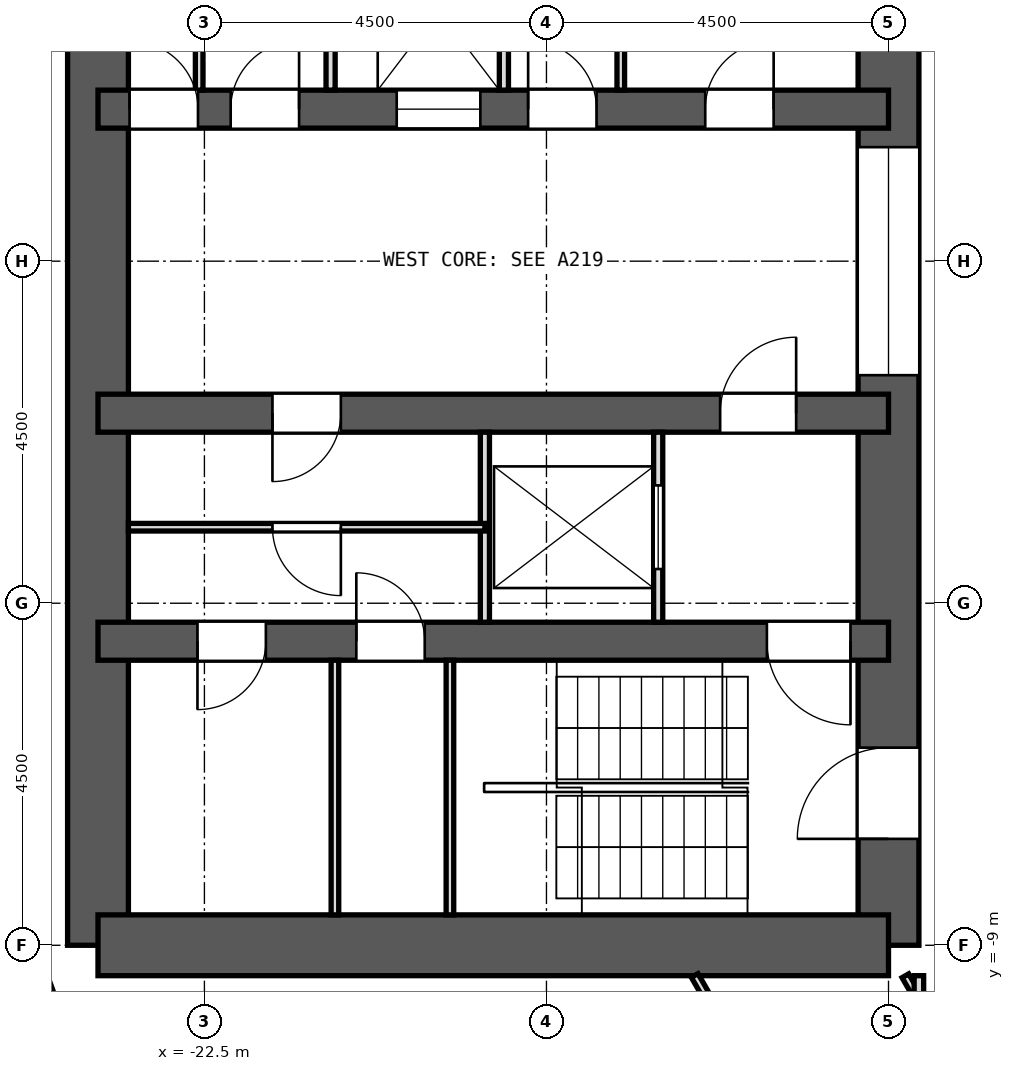
"""IFC4 building model, lengths in metres.
Left out: names, types, materials, properties, quantities, classifications, styles, units other than length and angle.
Written with IfcOpenShell. Run it as: python <this file> out.ifc"""

import sys

from ifc_helpers import new_model, si_unit, direction, frame, frame_2d, origin, place, context, subcontext, project, spatial, rectangle, extrude, element, fill, save


model = new_model("IFC4")
c1 = context("Model", 3, precision=1e-05, world=origin(), true_north=direction((0.0, 1.0)))
c2 = subcontext(c1, "Body", "Model", "MODEL_VIEW")
j1 = project(units=[si_unit("LENGTHUNIT", "METRE"), si_unit("PLANEANGLEUNIT", "RADIAN")], contexts=[c1])
p1 = place(None, origin())
s1 = spatial("IfcSite", under=j1, at=p1, CompositionType="ELEMENT")
p2 = place(p1, origin())
s2 = spatial("IfcBuilding", under=s1, at=p2, CompositionType="ELEMENT")
p3 = place(p2, frame((0.0, 0.0, 111.7)))
s3 = spatial("IfcBuildingStorey", under=s2, at=p3, CompositionType="ELEMENT", Elevation=111.7)
p4 = place(p3, frame((-13.5, -9.0, 0.0), z_axis=(0.0, 0.0, 1.0), x_axis=(0.0, 1.0, 0.0)))
e1 = element("IfcWall", 1, at=p4, inside=s3, PredefinedType="SHEAR", context=c2, shape_type="SweptSolid", body=[
    extrude(rectangle(XDim=18.0, YDim=0.8, at=frame_2d((9.0, 0.0))), origin(), (0.0, 0.0, 1.0), 3.3),
])
p5 = place(p4, frame((15.4, 0.0, 0.0)))
e2 = element("IfcOpeningElement", 2, at=p5, cuts=e1, PredefinedType="OPENING", context=c2, shape_type="SweptSolid", body=[
    extrude(rectangle(XDim=1.2, YDim=2.1, at=frame_2d((0.6, 1.05))), frame((0.0, 0.412, 0.0), z_axis=(0.0, -1.0, 0.0), x_axis=(1.0, 0.0, 0.0)), (0.0, 0.0, 1.0), 0.824),
])
p6 = place(p4, frame((1.4, 0.0, 0.0)))
e3 = element("IfcOpeningElement", 3, at=p6, cuts=e1, PredefinedType="OPENING", context=c2, shape_type="SweptSolid", body=[
    extrude(rectangle(XDim=1.2, YDim=2.1, at=frame_2d((0.6, 1.05))), frame((0.0, 0.412, 0.0), z_axis=(0.0, -1.0, 0.0), x_axis=(1.0, 0.0, 0.0)), (0.0, 0.0, 1.0), 0.824),
])
p7 = place(p4, frame((7.5, 0.0, 0.0)))
e4 = element("IfcOpeningElement", 4, at=p7, cuts=e1, PredefinedType="OPENING", context=c2, shape_type="SweptSolid", body=[
    extrude(rectangle(XDim=3.0, YDim=2.4, at=frame_2d((1.5, 1.2))), frame((0.0, 0.412, 0.0), z_axis=(0.0, -1.0, 0.0), x_axis=(1.0, 0.0, 0.0)), (0.0, 0.0, 1.0), 0.824),
])
p8 = place(p3, frame((-23.9, -9.0, 0.0), z_axis=(0.0, 0.0, 1.0), x_axis=(0.0, 1.0, 0.0)))
e5 = element("IfcWall", 5, at=p8, inside=s3, PredefinedType="SHEAR", context=c2, shape_type="SweptSolid", body=[
    extrude(rectangle(XDim=18.0, YDim=0.8, at=frame_2d((9.0, 0.0))), origin(), (0.0, 0.0, 1.0), 3.3),
])
p9 = place(p3, frame((-13.5, -9.0, 0.0), z_axis=(0.0, 0.0, 1.0), x_axis=(-1.0, 0.0, 0.0)))
e6 = element("IfcWall", 6, at=p9, inside=s3, PredefinedType="SHEAR", context=c2, shape_type="SweptSolid", body=[
    extrude(rectangle(XDim=10.4, YDim=0.8, at=frame_2d((5.2, 0.0))), origin(), (0.0, 0.0, 1.0), 3.3),
])
p10 = place(p3, frame((-13.5, -5.0, 0.0), z_axis=(0.0, 0.0, 1.0), x_axis=(-1.0, 0.0, 0.0)))
e7 = element("IfcWall", 7, at=p10, inside=s3, PredefinedType="SHEAR", context=c2, shape_type="SweptSolid", body=[
    extrude(rectangle(XDim=10.4, YDim=0.5, at=frame_2d((5.2, 0.0))), origin(), (0.0, 0.0, 1.0), 3.3),
])
p11 = place(p10, frame((6.102, 0.0, 0.0)))
e8 = element("IfcOpeningElement", 8, at=p11, cuts=e7, PredefinedType="OPENING", context=c2, shape_type="SweptSolid", body=[
    extrude(rectangle(XDim=0.9, YDim=2.1, at=frame_2d((0.45, 1.05))), frame((0.0, 0.262, 0.0), z_axis=(0.0, -1.0, 0.0), x_axis=(1.0, 0.0, 0.0)), (0.0, 0.0, 1.0), 0.524),
])
p12 = place(p10, frame((8.191, 0.0, 0.0)))
e9 = element("IfcOpeningElement", 9, at=p12, cuts=e7, PredefinedType="OPENING", context=c2, shape_type="SweptSolid", body=[
    extrude(rectangle(XDim=0.9, YDim=2.1, at=frame_2d((0.45, 1.05))), frame((0.0, 0.262, 0.0), z_axis=(0.0, -1.0, 0.0), x_axis=(1.0, 0.0, 0.0)), (0.0, 0.0, 1.0), 0.524),
])
p13 = place(p10, frame((0.5, 0.0, 0.0)))
e10 = element("IfcOpeningElement", 10, at=p13, cuts=e7, PredefinedType="OPENING", context=c2, shape_type="SweptSolid", body=[
    extrude(rectangle(XDim=1.1, YDim=2.1, at=frame_2d((0.55, 1.05))), frame((0.0, 0.262, 0.0), z_axis=(0.0, -1.0, 0.0), x_axis=(1.0, 0.0, 0.0)), (0.0, 0.0, 1.0), 0.524),
])
p14 = place(p3, frame((-13.5, 2.0, 0.0), z_axis=(0.0, 0.0, 1.0), x_axis=(-1.0, 0.0, 0.0)))
e11 = element("IfcWall", 11, at=p14, inside=s3, PredefinedType="SHEAR", context=c2, shape_type="SweptSolid", body=[
    extrude(rectangle(XDim=10.4, YDim=0.5, at=frame_2d((5.2, 0.0))), origin(), (0.0, 0.0, 1.0), 3.3),
])
p15 = place(p14, frame((5.37, 0.0, 0.0)))
e12 = element("IfcOpeningElement", 12, at=p15, cuts=e11, PredefinedType="OPENING", context=c2, shape_type="SweptSolid", body=[
    extrude(rectangle(XDim=1.1, YDim=2.1, at=frame_2d((0.55, 1.05))), frame((0.0, 0.262, 0.0), z_axis=(0.0, -1.0, 0.0), x_axis=(1.0, 0.0, 0.0)), (0.0, 0.0, 1.0), 0.524),
])
p16 = place(p14, frame((1.511, 0.0, 0.0)))
e13 = element("IfcOpeningElement", 13, at=p16, cuts=e11, PredefinedType="OPENING", context=c2, shape_type="SweptSolid", body=[
    extrude(rectangle(XDim=0.9, YDim=2.1, at=frame_2d((0.45, 1.05))), frame((0.0, 0.262, 0.0), z_axis=(0.0, -1.0, 0.0), x_axis=(1.0, 0.0, 0.0)), (0.0, 0.0, 1.0), 0.524),
])
p17 = place(p14, frame((3.841, 0.0, 0.0)))
e14 = element("IfcOpeningElement", 14, at=p17, cuts=e11, PredefinedType="OPENING", context=c2, shape_type="SweptSolid", body=[
    extrude(rectangle(XDim=0.9, YDim=2.1, at=frame_2d((0.45, 1.05))), frame((0.0, 0.262, 0.0), z_axis=(0.0, -1.0, 0.0), x_axis=(1.0, 0.0, 0.0)), (0.0, 0.0, 1.0), 0.524),
])
p18 = place(p14, frame((7.754, 0.0, 0.0)))
e15 = element("IfcOpeningElement", 15, at=p18, cuts=e11, PredefinedType="OPENING", context=c2, shape_type="SweptSolid", body=[
    extrude(rectangle(XDim=0.9, YDim=2.1, at=frame_2d((0.45, 1.05))), frame((0.0, 0.262, 0.0), z_axis=(0.0, -1.0, 0.0), x_axis=(1.0, 0.0, 0.0)), (0.0, 0.0, 1.0), 0.524),
])
p19 = place(p14, frame((9.084, 0.0, 0.0)))
e16 = element("IfcOpeningElement", 16, at=p19, cuts=e11, PredefinedType="OPENING", context=c2, shape_type="SweptSolid", body=[
    extrude(rectangle(XDim=0.9, YDim=2.1, at=frame_2d((0.45, 1.05))), frame((0.0, 0.262, 0.0), z_axis=(0.0, -1.0, 0.0), x_axis=(1.0, 0.0, 0.0)), (0.0, 0.0, 1.0), 0.524),
])
p20 = place(p3, frame((-13.5, -2.0, 0.0), z_axis=(0.0, 0.0, 1.0), x_axis=(-1.0, 0.0, 0.0)))
e17 = element("IfcWall", 17, at=p20, inside=s3, PredefinedType="SHEAR", context=c2, shape_type="SweptSolid", body=[
    extrude(rectangle(XDim=10.4, YDim=0.5, at=frame_2d((5.2, 0.0))), origin(), (0.0, 0.0, 1.0), 3.3),
])
p21 = place(p20, frame((1.215, 0.0, 0.0)))
e18 = element("IfcOpeningElement", 18, at=p21, cuts=e17, PredefinedType="OPENING", context=c2, shape_type="SweptSolid", body=[
    extrude(rectangle(XDim=1.0, YDim=2.1, at=frame_2d((0.5, 1.05))), frame((0.0, 0.262, 0.0), z_axis=(0.0, -1.0, 0.0), x_axis=(1.0, 0.0, 0.0)), (0.0, 0.0, 1.0), 0.524),
])
p22 = place(p20, frame((7.205, 0.0, 0.0)))
e19 = element("IfcOpeningElement", 19, at=p22, cuts=e17, PredefinedType="OPENING", context=c2, shape_type="SweptSolid", body=[
    extrude(rectangle(XDim=0.9, YDim=2.1, at=frame_2d((0.45, 1.05))), frame((0.0, 0.262, 0.0), z_axis=(0.0, -1.0, 0.0), x_axis=(1.0, 0.0, 0.0)), (0.0, 0.0, 1.0), 0.524),
])
p23 = place(p3, frame((-25.617, -7.383, 0.0), z_axis=(0.0, 0.0, 1.0), x_axis=(0.341990236633, -0.939703505393, 0.0)))
e20 = element("IfcWall", 20, at=p23, inside=s3, PredefinedType="SOLIDWALL", context=c2, shape_type="SweptSolid", body=[
    extrude(rectangle(XDim=3.648, YDim=0.6, at=frame_2d((1.824, 0.0))), origin(), (0.0, 0.0, 1.0), 2.8),
])
p24 = place(p3, frame((-13.278, -9.401, 0.0), z_axis=(0.0, 0.0, 1.0), x_axis=(0.49953088146, -0.866296080141, 0.0)))
e21 = element("IfcWall", 21, at=p24, inside=s3, PredefinedType="PARTITIONING", context=c2, shape_type="SweptSolid", body=[
    extrude(rectangle(XDim=0.294, YDim=0.1, at=frame_2d((0.147, 0.0))), origin(), (0.0, 0.0, 1.0), 2.8),
])
p25 = place(p3, frame((-16.05, -9.398, 0.0), z_axis=(0.0, 0.0, 1.0), x_axis=(0.499614353746, -0.866247942296, 0.0)))
e22 = element("IfcWall", 22, at=p25, inside=s3, PredefinedType="PARTITIONING", context=c2, shape_type="SweptSolid", body=[
    extrude(rectangle(XDim=1.564, YDim=0.1, at=frame_2d((0.782, 0.0))), origin(), (0.0, 0.0, 1.0), 2.8),
])
p26 = place(p3, frame((-13.167, -13.166, 0.0), z_axis=(0.0, 0.0, 1.0), x_axis=(0.707391477554, 0.706821970148, 0.0)))
e23 = element("IfcWall", 23, at=p26, inside=s3, PredefinedType="PARTITIONING", context=c2, shape_type="SweptSolid", body=[
    extrude(rectangle(XDim=7.716, YDim=0.125, at=frame_2d((3.858, 0.0))), origin(), (0.0, 0.0, 1.0), 2.8),
])
p27 = place(p3, frame((-13.1, -13.032, 0.0), z_axis=(0.0, 0.0, 1.0), x_axis=(0.0, 1.0, 0.0)))
e24 = element("IfcWall", 24, at=p27, inside=s3, PredefinedType="PARTITIONING", context=c2, shape_type="SweptSolid", body=[
    extrude(rectangle(XDim=3.633, YDim=0.125, at=frame_2d((1.816, 0.0))), origin(), (0.0, 0.0, 1.0), 2.8),
])
p28 = place(p3, frame((-17.022, 2.25, 0.0), z_axis=(0.0, 0.0, 1.0), x_axis=(0.0, 1.0, 0.0)))
e25 = element("IfcWall", 25, at=p28, inside=s3, PredefinedType="PARTITIONING", context=c2, shape_type="SweptSolid", body=[
    extrude(rectangle(XDim=2.5, YDim=0.1, at=frame_2d((1.25, 0.0))), origin(), (0.0, 0.0, 1.0), 2.8),
])
for number, where, z_axis, x_axis in (
    (26, (-18.56, 2.25, 0.0), (0.0, 0.0, 1.0), (0.0, 1.0, 0.0)),
    (27, (-20.84, 2.25, 0.0), (0.0, 0.0, 1.0), (0.0, 1.0, 0.0)),
):
    element("IfcWall", number, at=place(p3, frame(where, z_axis=z_axis, x_axis=x_axis)), inside=s3, PredefinedType="PARTITIONING", context=c2, shape_type="SweptSolid", body=[
        extrude(rectangle(XDim=2.5, YDim=0.12, at=frame_2d((1.25, 0.0))), origin(), (0.0, 0.0, 1.0), 2.8),
    ])
p29 = place(p3, frame((-22.569, 2.25, 0.0), z_axis=(0.0, 0.0, 1.0), x_axis=(0.0, 1.0, 0.0)))
e28 = element("IfcWall", 28, at=p29, inside=s3, PredefinedType="PARTITIONING", context=c2, shape_type="SweptSolid", body=[
    extrude(rectangle(XDim=2.5, YDim=0.1, at=frame_2d((1.25, 0.0))), origin(), (0.0, 0.0, 1.0), 2.8),
])
p30 = place(p3, frame((-16.53, -4.75, 0.0), z_axis=(0.0, 0.0, 1.0), x_axis=(0.0, 1.0, 0.0)))
e29 = element("IfcWall", 29, at=p30, inside=s3, PredefinedType="PARTITIONING", context=c2, shape_type="SweptSolid", body=[
    extrude(rectangle(XDim=2.5, YDim=0.12, at=frame_2d((1.25, 0.0))), origin(), (0.0, 0.0, 1.0), 2.8),
])
p31 = place(p30, frame((0.7, 0.0, 0.0)))
e30 = element("IfcOpeningElement", 30, at=p31, cuts=e29, PredefinedType="OPENING", context=c2, shape_type="SweptSolid", body=[
    extrude(rectangle(XDim=1.1, YDim=2.1, at=frame_2d((0.55, 1.05))), frame((0.0, 0.072, 0.0), z_axis=(0.0, -1.0, 0.0), x_axis=(1.0, 0.0, 0.0)), (0.0, 0.0, 1.0), 0.144),
])
p32 = place(p3, frame((-18.81, -4.75, 0.0), z_axis=(0.0, 0.0, 1.0), x_axis=(0.0, 1.0, 0.0)))
e31 = element("IfcWall", 31, at=p32, inside=s3, PredefinedType="PARTITIONING", context=c2, shape_type="SweptSolid", body=[
    extrude(rectangle(XDim=2.5, YDim=0.12, at=frame_2d((1.25, 0.0))), origin(), (0.0, 0.0, 1.0), 2.8),
])
p33 = place(p3, frame((-18.81, -3.5, 0.0), z_axis=(0.0, 0.0, 1.0), x_axis=(-1.0, 0.0, 0.0)))
e32 = element("IfcWall", 32, at=p33, inside=s3, PredefinedType="PARTITIONING", context=c2, shape_type="SweptSolid", body=[
    extrude(rectangle(XDim=4.69, YDim=0.1, at=frame_2d((2.345, 0.0))), origin(), (0.0, 0.0, 1.0), 2.8),
])
p34 = place(p33, frame((1.895, 0.0, 0.0)))
e33 = element("IfcOpeningElement", 33, at=p34, cuts=e32, PredefinedType="OPENING", context=c2, shape_type="SweptSolid", body=[
    extrude(rectangle(XDim=0.9, YDim=2.1, at=frame_2d((0.45, 1.05))), frame((0.0, 0.062, 0.0), z_axis=(0.0, -1.0, 0.0), x_axis=(1.0, 0.0, 0.0)), (0.0, 0.0, 1.0), 0.124),
])
for number, where, z_axis, x_axis in (
    (34, (-19.27, -8.6, 0.0), (0.0, 0.0, 1.0), (0.0, 1.0, 0.0)),
    (35, (-20.783, -8.6, 0.0), (0.0, 0.0, 1.0), (0.0, 1.0, 0.0)),
):
    element("IfcWall", number, at=place(p3, frame(where, z_axis=z_axis, x_axis=x_axis)), inside=s3, PredefinedType="PARTITIONING", context=c2, shape_type="SweptSolid", body=[
        extrude(rectangle(XDim=3.35, YDim=0.1, at=frame_2d((1.675, 0.0))), origin(), (0.0, 0.0, 1.0), 2.8),
    ])
p35 = place(p15, origin())
e36 = element("IfcDoor", 36, at=p35, inside=s3, OperationType="DOUBLE_DOOR_SLIDING", PredefinedType="DOOR", context=c2, shape_type="SweptSolid", body=[
    extrude(rectangle(XDim=1.1, YDim=2.1, at=frame_2d((0.55, 1.05))), frame((0.0, 0.025, 0.0), z_axis=(0.0, -1.0, 0.0), x_axis=(1.0, 0.0, 0.0)), (0.0, 0.0, 1.0), 0.05),
])
fill(e12, e36)
p36 = place(p31, origin())
e37 = element("IfcDoor", 37, at=p36, inside=s3, OperationType="DOUBLE_DOOR_SLIDING", PredefinedType="DOOR", context=c2, shape_type="SweptSolid", body=[
    extrude(rectangle(XDim=1.1, YDim=2.1, at=frame_2d((0.55, 1.05))), frame((0.0, 0.025, 0.0), z_axis=(0.0, -1.0, 0.0), x_axis=(1.0, 0.0, 0.0)), (0.0, 0.0, 1.0), 0.05),
])
fill(e30, e37)
p37 = place(p16, frame((0.9, 0.0, 0.0), z_axis=(0.0, 0.0, 1.0), x_axis=(-1.0, 0.0, 0.0)))
e38 = element("IfcDoor", 38, at=p37, inside=s3, OperationType="SINGLE_SWING_RIGHT", PredefinedType="DOOR", context=c2, shape_type="SweptSolid", body=[
    extrude(rectangle(XDim=0.9, YDim=2.1, at=frame_2d((0.45, 1.05))), frame((0.0, 0.025, 0.0), z_axis=(0.0, -1.0, 0.0), x_axis=(1.0, 0.0, 0.0)), (0.0, 0.0, 1.0), 0.05),
])
fill(e13, e38)
p38 = place(p17, frame((0.9, 0.0, 0.0), z_axis=(0.0, 0.0, 1.0), x_axis=(-1.0, 0.0, 0.0)))
e39 = element("IfcDoor", 39, at=p38, inside=s3, OperationType="SINGLE_SWING_LEFT", PredefinedType="DOOR", context=c2, shape_type="SweptSolid", body=[
    extrude(rectangle(XDim=0.9, YDim=2.1, at=frame_2d((0.45, 1.05))), frame((0.0, 0.025, 0.0), z_axis=(0.0, -1.0, 0.0), x_axis=(1.0, 0.0, 0.0)), (0.0, 0.0, 1.0), 0.05),
])
fill(e14, e39)
p39 = place(p18, frame((0.9, 0.0, 0.0), z_axis=(0.0, 0.0, 1.0), x_axis=(-1.0, 0.0, 0.0)))
e40 = element("IfcDoor", 40, at=p39, inside=s3, OperationType="SINGLE_SWING_RIGHT", PredefinedType="DOOR", context=c2, shape_type="SweptSolid", body=[
    extrude(rectangle(XDim=0.9, YDim=2.1, at=frame_2d((0.45, 1.05))), frame((0.0, 0.025, 0.0), z_axis=(0.0, -1.0, 0.0), x_axis=(1.0, 0.0, 0.0)), (0.0, 0.0, 1.0), 0.05),
])
fill(e15, e40)
p40 = place(p19, frame((0.9, 0.0, 0.0), z_axis=(0.0, 0.0, 1.0), x_axis=(-1.0, 0.0, 0.0)))
e41 = element("IfcDoor", 41, at=p40, inside=s3, OperationType="SINGLE_SWING_LEFT", PredefinedType="DOOR", context=c2, shape_type="SweptSolid", body=[
    extrude(rectangle(XDim=0.9, YDim=2.1, at=frame_2d((0.45, 1.05))), frame((0.0, 0.025, 0.0), z_axis=(0.0, -1.0, 0.0), x_axis=(1.0, 0.0, 0.0)), (0.0, 0.0, 1.0), 0.05),
])
fill(e16, e41)
p41 = place(p21, frame((1.0, 0.0, 0.0), z_axis=(0.0, 0.0, 1.0), x_axis=(-1.0, 0.0, 0.0)))
e42 = element("IfcDoor", 42, at=p41, inside=s3, OperationType="SINGLE_SWING_RIGHT", PredefinedType="DOOR", context=c2, shape_type="SweptSolid", body=[
    extrude(rectangle(XDim=1.0, YDim=2.1, at=frame_2d((0.5, 1.05))), frame((0.0, 0.025, 0.0), z_axis=(0.0, -1.0, 0.0), x_axis=(1.0, 0.0, 0.0)), (0.0, 0.0, 1.0), 0.05),
])
fill(e18, e42)
p42 = place(p22, origin())
e43 = element("IfcDoor", 43, at=p42, inside=s3, OperationType="SINGLE_SWING_RIGHT", PredefinedType="DOOR", context=c2, shape_type="SweptSolid", body=[
    extrude(rectangle(XDim=0.9, YDim=2.1, at=frame_2d((0.45, 1.05))), frame((0.0, 0.025, 0.0), z_axis=(0.0, -1.0, 0.0), x_axis=(1.0, 0.0, 0.0)), (0.0, 0.0, 1.0), 0.05),
])
fill(e19, e43)
p43 = place(p34, origin())
e44 = element("IfcDoor", 44, at=p43, inside=s3, OperationType="SINGLE_SWING_LEFT", PredefinedType="DOOR", context=c2, shape_type="SweptSolid", body=[
    extrude(rectangle(XDim=0.9, YDim=2.1, at=frame_2d((0.45, 1.05))), frame((0.0, 0.025, 0.0), z_axis=(0.0, -1.0, 0.0), x_axis=(1.0, 0.0, 0.0)), (0.0, 0.0, 1.0), 0.05),
])
fill(e33, e44)
p44 = place(p11, frame((0.9, 0.0, 0.0), z_axis=(0.0, 0.0, 1.0), x_axis=(-1.0, 0.0, 0.0)))
e45 = element("IfcDoor", 45, at=p44, inside=s3, OperationType="SINGLE_SWING_LEFT", PredefinedType="DOOR", context=c2, shape_type="SweptSolid", body=[
    extrude(rectangle(XDim=0.9, YDim=2.1, at=frame_2d((0.45, 1.05))), frame((0.0, 0.025, 0.0), z_axis=(0.0, -1.0, 0.0), x_axis=(1.0, 0.0, 0.0)), (0.0, 0.0, 1.0), 0.05),
])
fill(e8, e45)
p45 = place(p12, origin())
e46 = element("IfcDoor", 46, at=p45, inside=s3, OperationType="SINGLE_SWING_RIGHT", PredefinedType="DOOR", context=c2, shape_type="SweptSolid", body=[
    extrude(rectangle(XDim=0.9, YDim=2.1, at=frame_2d((0.45, 1.05))), frame((0.0, 0.025, 0.0), z_axis=(0.0, -1.0, 0.0), x_axis=(1.0, 0.0, 0.0)), (0.0, 0.0, 1.0), 0.05),
])
fill(e9, e46)
p46 = place(p13, origin())
e47 = element("IfcDoor", 47, at=p46, inside=s3, OperationType="SINGLE_SWING_LEFT", PredefinedType="DOOR", context=c2, shape_type="SweptSolid", body=[
    extrude(rectangle(XDim=1.1, YDim=2.1, at=frame_2d((0.55, 1.05))), frame((0.0, 0.025, 0.0), z_axis=(0.0, -1.0, 0.0), x_axis=(1.0, 0.0, 0.0)), (0.0, 0.0, 1.0), 0.05),
])
fill(e10, e47)
p47 = place(p6, origin())
e48 = element("IfcDoor", 48, at=p47, inside=s3, OperationType="SINGLE_SWING_LEFT", PredefinedType="DOOR", context=c2, shape_type="SweptSolid", body=[
    extrude(rectangle(XDim=1.2, YDim=2.1, at=frame_2d((0.6, 1.05))), frame((0.0, 0.025, 0.0), z_axis=(0.0, -1.0, 0.0), x_axis=(1.0, 0.0, 0.0)), (0.0, 0.0, 1.0), 0.05),
])
fill(e3, e48)
p48 = place(p7, origin())
e49 = element("IfcDoor", 49, at=p48, inside=s3, OperationType="DOUBLE_DOOR_SLIDING", PredefinedType="DOOR", context=c2, shape_type="SweptSolid", body=[
    extrude(rectangle(XDim=3.0, YDim=2.4, at=frame_2d((1.5, 1.2))), frame((0.0, 0.025, 0.0), z_axis=(0.0, -1.0, 0.0), x_axis=(1.0, 0.0, 0.0)), (0.0, 0.0, 1.0), 0.05),
])
fill(e4, e49)
save(model, sys.argv[1])
